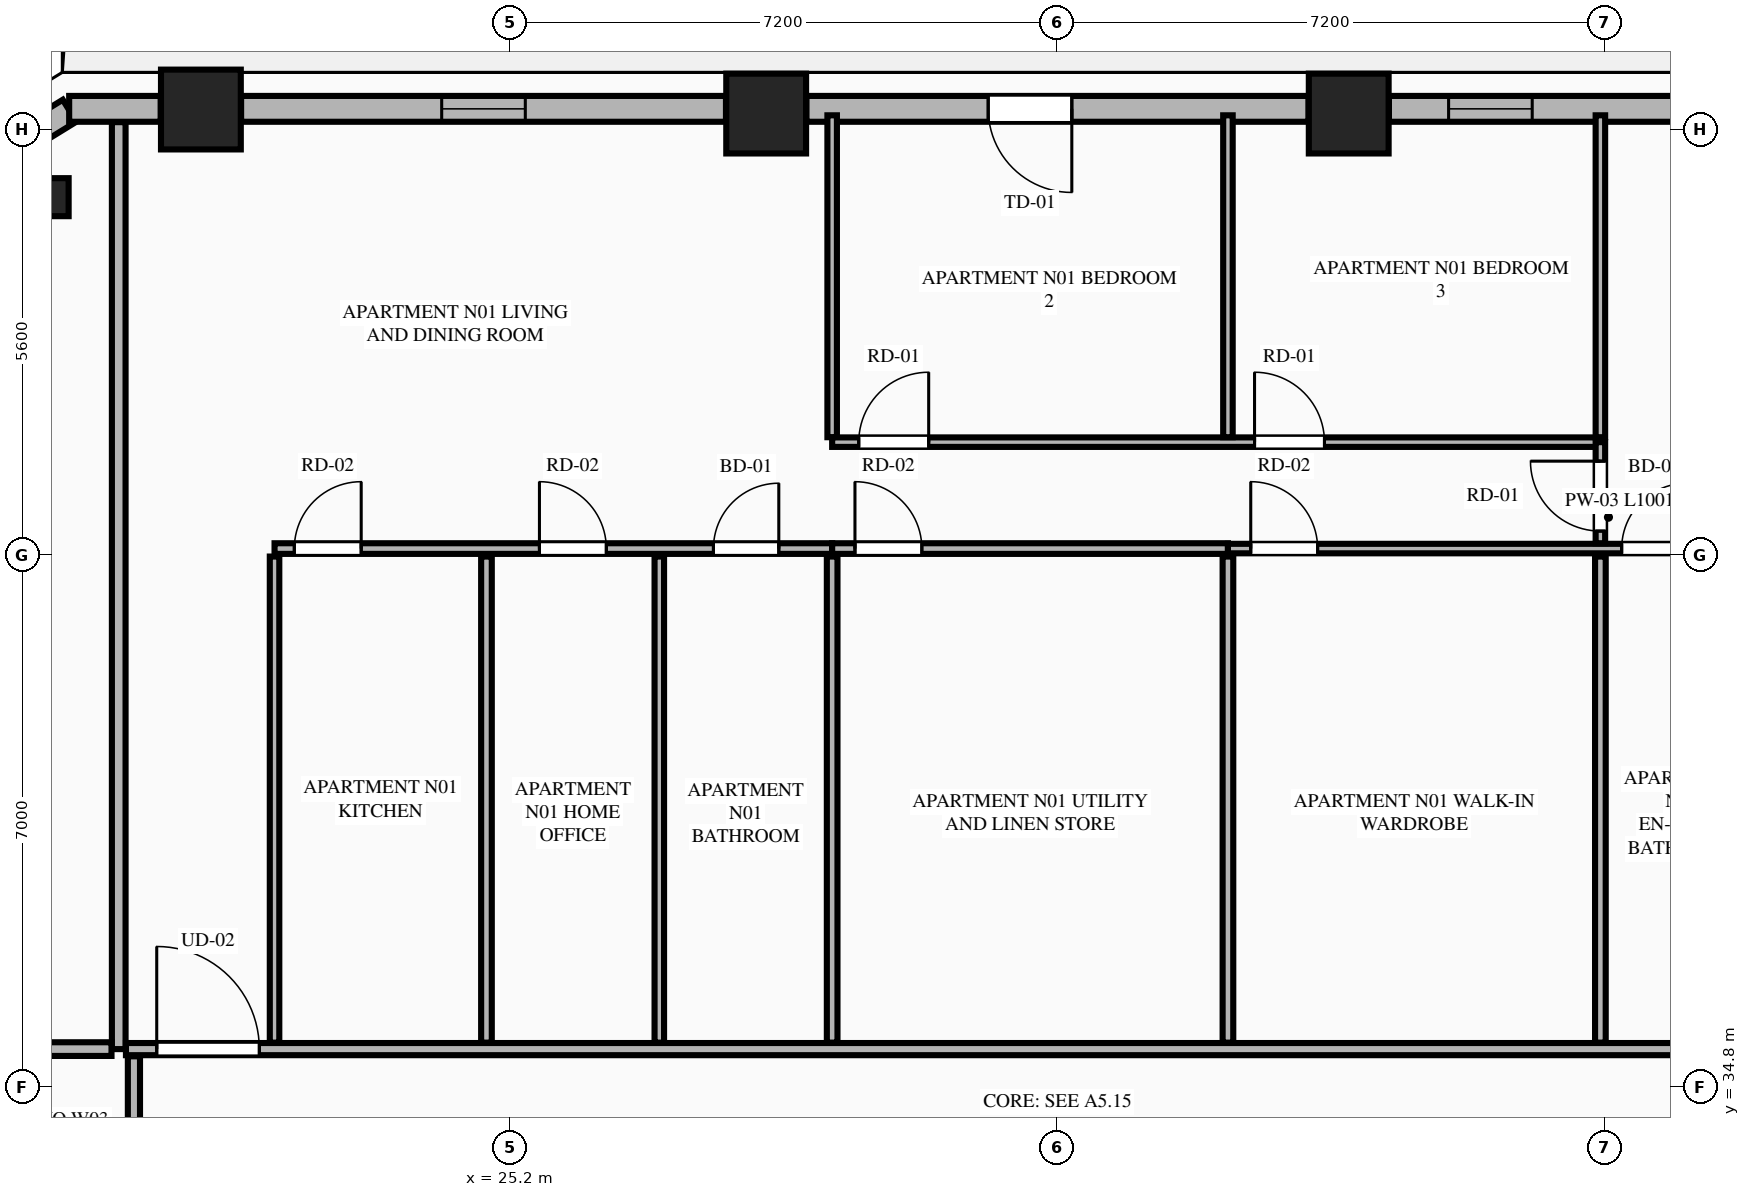
"""IFC4 building model, lengths in metres.
Left out: names, types, materials, properties, quantities, classifications, styles, units other than length and angle.
Written with IfcOpenShell. Run it as: python <this file> out.ifc"""

import sys

from ifc_helpers import new_model, si_unit, direction, frame, frame_2d, origin, origin_2d, place, context, subcontext, project, spatial, rectangle, extrude, element, fill, save


model = new_model("IFC4")
c1 = context("Model", 3, precision=1e-05, world=origin(), true_north=direction((0.0, 1.0)))
c2 = subcontext(c1, "Body", "Model", "MODEL_VIEW")
j1 = project(units=[si_unit("LENGTHUNIT", "METRE"), si_unit("PLANEANGLEUNIT", "RADIAN")], contexts=[c1])
p1 = place(None, origin())
s1 = spatial("IfcSite", under=j1, at=p1, CompositionType="ELEMENT")
p2 = place(p1, origin())
s2 = spatial("IfcBuilding", under=s1, at=p2, CompositionType="ELEMENT")
p3 = place(p2, frame((0.0, 0.0, 116.15)))
s3 = spatial("IfcBuildingStorey", under=s2, at=p3, CompositionType="ELEMENT", Elevation=116.15)
for number, where, z_axis, x_axis in (
    (1, (36.232, 47.608, 0.0), (0.0, 0.0, 1.0), (1.0, 0.0, 0.0)),
    (2, (28.568, 47.608, 0.0), (0.0, 0.0, 1.0), (1.0, 0.0, 0.0)),
    (3, (21.131, 47.661, 0.0), (0.0, 0.0, 1.0), (1.0, 0.0, 0.0)),
):
    element("IfcColumn", number, at=place(p3, frame(where, z_axis=z_axis, x_axis=x_axis)), inside=s3, PredefinedType="COLUMN", context=c2, shape_type="SweptSolid", body=[
        extrude(rectangle(XDim=1.05, YDim=1.05, at=origin_2d()), origin(), (0.0, 0.0, 1.0), 3.55),
    ])
p4 = place(p3, frame((19.141, 46.508, 0.0), z_axis=(0.0, 0.0, 1.0), x_axis=(-0.865160173452, -0.501495637342, 0.0)))
e4 = element("IfcColumn", 4, at=p4, inside=s3, PredefinedType="PILASTER", context=c2, shape_type="SweptSolid", body=[
    extrude(rectangle(XDim=0.5, YDim=0.35, at=origin_2d()), origin(), (0.0, 0.0, 1.0), 3.55),
])
p5 = place(p3, frame((19.403, 47.645, 0.0), z_axis=(0.0, 0.0, 1.0), x_axis=(-0.851798915137, -0.523868884523, 0.0)))
e5 = element("IfcWall", 5, at=p5, inside=s3, PredefinedType="STANDARD", context=c2, shape_type="SweptSolid", body=[
    extrude(rectangle(XDim=1.848, YDim=0.34, at=frame_2d((0.924, 0.0))), origin(), (0.0, 0.0, 1.0), 3.34),
])
p6 = place(p3, frame((43.14, 47.67, 0.0), z_axis=(0.0, 0.0, 1.0), x_axis=(-1.0, 0.0, 0.0)))
e6 = element("IfcWall", 6, at=p6, inside=s3, PredefinedType="STANDARD", context=c2, shape_type="SweptSolid", body=[
    extrude(rectangle(XDim=6.379, YDim=0.34, at=frame_2d((3.189, 0.0))), origin(), (0.0, 0.0, 1.0), 2.797),
])
p7 = place(p6, frame((1.192, 0.0, 0.75)))
e7 = element("IfcOpeningElement", 7, at=p7, cuts=e6, PredefinedType="OPENING", context=c2, shape_type="SweptSolid", body=[
    extrude(rectangle(XDim=1.1, YDim=1.897, at=frame_2d((0.55, 0.948))), frame((0.0, 0.18, 0.0), z_axis=(0.0, -1.0, 0.0), x_axis=(1.0, 0.0, 0.0)), (0.0, 0.0, 1.0), 0.36),
])
p8 = place(p6, frame((4.494, 0.0, 0.75)))
e8 = element("IfcOpeningElement", 8, at=p8, cuts=e6, PredefinedType="OPENING", context=c2, shape_type="SweptSolid", body=[
    extrude(rectangle(XDim=1.1, YDim=1.897, at=frame_2d((0.55, 0.948))), frame((0.0, 0.18, 0.0), z_axis=(0.0, -1.0, 0.0), x_axis=(1.0, 0.0, 0.0)), (0.0, 0.0, 1.0), 0.36),
])
p9 = place(p3, frame((35.703, 47.67, 0.0), z_axis=(0.0, 0.0, 1.0), x_axis=(-1.0, 0.0, 0.0)))
e9 = element("IfcWall", 9, at=p9, inside=s3, PredefinedType="STANDARD", context=c2, shape_type="SweptSolid", body=[
    extrude(rectangle(XDim=6.606, YDim=0.34, at=frame_2d((3.303, 0.0))), origin(), (0.0, 0.0, 1.0), 2.797),
])
p10 = place(p9, frame((3.114, 0.0, 0.0)))
e10 = element("IfcOpeningElement", 10, at=p10, cuts=e9, PredefinedType="OPENING", context=c2, shape_type="SweptSolid", body=[
    extrude(rectangle(XDim=1.1, YDim=2.25, at=frame_2d((0.55, 1.125))), frame((0.0, 0.18, 0.0), z_axis=(0.0, -1.0, 0.0), x_axis=(1.0, 0.0, 0.0)), (0.0, 0.0, 1.0), 0.36),
])
p11 = place(p3, frame((28.039, 47.67, 0.0), z_axis=(0.0, 0.0, 1.0), x_axis=(-1.0, 0.0, 0.0)))
e11 = element("IfcWall", 11, at=p11, inside=s3, PredefinedType="STANDARD", context=c2, shape_type="SweptSolid", body=[
    extrude(rectangle(XDim=6.379, YDim=0.34, at=frame_2d((3.189, 0.0))), origin(), (0.0, 0.0, 1.0), 2.797),
])
p12 = place(p11, frame((2.64, 0.0, 0.75)))
e12 = element("IfcOpeningElement", 12, at=p12, cuts=e11, PredefinedType="OPENING", context=c2, shape_type="SweptSolid", body=[
    extrude(rectangle(XDim=1.1, YDim=1.897, at=frame_2d((0.55, 0.948))), frame((0.0, 0.18, 0.0), z_axis=(0.0, -1.0, 0.0), x_axis=(1.0, 0.0, 0.0)), (0.0, 0.0, 1.0), 0.36),
])
p13 = place(p3, frame((20.602, 47.67, 0.0), z_axis=(0.0, 0.0, 1.0), x_axis=(-1.0, 0.0, 0.0)))
e13 = element("IfcWall", 13, at=p13, inside=s3, PredefinedType="STANDARD", context=c2, shape_type="SweptSolid", body=[
    extrude(rectangle(XDim=1.204, YDim=0.34, at=frame_2d((0.602, 0.0))), origin(), (0.0, 0.0, 1.0), 3.34),
])
p14 = place(p3, frame((20.05, 35.3, 0.0), z_axis=(0.0, 0.0, 1.0), x_axis=(0.0, 1.0, 0.0)))
e14 = element("IfcWall", 14, at=p14, inside=s3, PredefinedType="PARTITIONING", context=c2, shape_type="SweptSolid", body=[
    extrude(rectangle(XDim=12.195, YDim=0.18, at=frame_2d((6.098, 0.0))), origin(), (0.0, 0.0, 1.0), 3.34),
])
p15 = place(p3, frame((20.145, 35.3, 0.0), z_axis=(0.0, 0.0, 1.0), x_axis=(1.0, 0.0, 0.0)))
e15 = element("IfcWall", 15, at=p15, inside=s3, PredefinedType="PARTITIONING", context=c2, shape_type="SweptSolid", body=[
    extrude(rectangle(XDim=24.51, YDim=0.16, at=frame_2d((12.255, 0.0))), origin(), (0.0, 0.0, 1.0), 3.34),
])
p16 = place(p15, frame((0.405, 0.0, 0.0)))
e16 = element("IfcOpeningElement", 16, at=p16, cuts=e15, PredefinedType="OPENING", context=c2, shape_type="SweptSolid", body=[
    extrude(rectangle(XDim=1.35, YDim=2.35, at=frame_2d((0.675, 1.175))), frame((0.0, 0.09, 0.0), z_axis=(0.0, -1.0, 0.0), x_axis=(1.0, 0.0, 0.0)), (0.0, 0.0, 1.0), 0.18),
])
p17 = place(p3, frame((22.1, 35.385, 0.0), z_axis=(0.0, 0.0, 1.0), x_axis=(0.0, 1.0, 0.0)))
e17 = element("IfcWall", 17, at=p17, inside=s3, PredefinedType="PARTITIONING", context=c2, shape_type="SweptSolid", body=[
    extrude(rectangle(XDim=6.395, YDim=0.125, at=frame_2d((3.198, 0.0))), origin(), (0.0, 0.0, 1.0), 2.722),
])
p18 = place(p3, frame((22.1, 41.885, 0.0), z_axis=(0.0, 0.0, 1.0), x_axis=(1.0, 0.0, 0.0)))
e18 = element("IfcWall", 18, at=p18, inside=s3, PredefinedType="PLUMBINGWALL", context=c2, shape_type="SweptSolid", body=[
    extrude(rectangle(XDim=7.336, YDim=0.14, at=frame_2d((3.668, 0.0))), origin(), (0.0, 0.0, 1.0), 3.34),
])
p19 = place(p18, frame((5.774, 0.0, 0.0)))
e19 = element("IfcOpeningElement", 19, at=p19, cuts=e18, PredefinedType="OPENING", context=c2, shape_type="SweptSolid", body=[
    extrude(rectangle(XDim=0.86, YDim=2.1, at=frame_2d((0.43, 1.05))), frame((0.0, 0.08, 0.0), z_axis=(0.0, -1.0, 0.0), x_axis=(1.0, 0.0, 0.0)), (0.0, 0.0, 1.0), 0.16),
])
p20 = place(p18, frame((0.26, 0.0, 0.0)))
e20 = element("IfcOpeningElement", 20, at=p20, cuts=e18, PredefinedType="OPENING", context=c2, shape_type="SweptSolid", body=[
    extrude(rectangle(XDim=0.88, YDim=2.15, at=frame_2d((0.44, 1.075))), frame((0.0, 0.08, 0.0), z_axis=(0.0, -1.0, 0.0), x_axis=(1.0, 0.0, 0.0)), (0.0, 0.0, 1.0), 0.16),
])
p21 = place(p18, frame((3.485, 0.0, 0.0)))
e21 = element("IfcOpeningElement", 21, at=p21, cuts=e18, PredefinedType="OPENING", context=c2, shape_type="SweptSolid", body=[
    extrude(rectangle(XDim=0.88, YDim=2.15, at=frame_2d((0.44, 1.075))), frame((0.0, 0.08, 0.0), z_axis=(0.0, -1.0, 0.0), x_axis=(1.0, 0.0, 0.0)), (0.0, 0.0, 1.0), 0.16),
])
p22 = place(p3, frame((29.436, 41.885, 0.0), z_axis=(0.0, 0.0, 1.0), x_axis=(1.0, 0.0, 0.0)))
e22 = element("IfcWall", 22, at=p22, inside=s3, PredefinedType="PLUMBINGWALL", context=c2, shape_type="SweptSolid", body=[
    extrude(rectangle(XDim=5.207, YDim=0.14, at=frame_2d((2.604, 0.0))), origin(), (0.0, 0.0, 1.0), 3.34),
])
p23 = place(p22, frame((0.3, 0.0, 0.0)))
e23 = element("IfcOpeningElement", 23, at=p23, cuts=e22, PredefinedType="OPENING", context=c2, shape_type="SweptSolid", body=[
    extrude(rectangle(XDim=0.88, YDim=2.15, at=frame_2d((0.44, 1.075))), frame((0.0, 0.08, 0.0), z_axis=(0.0, -1.0, 0.0), x_axis=(1.0, 0.0, 0.0)), (0.0, 0.0, 1.0), 0.16),
])
p24 = place(p3, frame((34.643, 41.885, 0.0), z_axis=(0.0, 0.0, 1.0), x_axis=(1.0, 0.0, 0.0)))
e24 = element("IfcWall", 24, at=p24, inside=s3, PredefinedType="PARTITIONING", context=c2, shape_type="SweptSolid", body=[
    extrude(rectangle(XDim=10.012, YDim=0.125, at=frame_2d((5.006, 0.0))), origin(), (0.0, 0.0, 1.0), 3.34),
])
p25 = place(p24, frame((5.18, 0.0, 0.0)))
e25 = element("IfcOpeningElement", 25, at=p25, cuts=e24, PredefinedType="OPENING", context=c2, shape_type="SweptSolid", body=[
    extrude(rectangle(XDim=0.86, YDim=2.1, at=frame_2d((0.43, 1.05))), frame((0.0, 0.073, 0.0), z_axis=(0.0, -1.0, 0.0), x_axis=(1.0, 0.0, 0.0)), (0.0, 0.0, 1.0), 0.145),
])
p26 = place(p24, frame((7.328, 0.0, 0.0)))
e26 = element("IfcOpeningElement", 26, at=p26, cuts=e24, PredefinedType="OPENING", context=c2, shape_type="SweptSolid", body=[
    extrude(rectangle(XDim=0.88, YDim=2.15, at=frame_2d((0.44, 1.075))), frame((0.0, 0.073, 0.0), z_axis=(0.0, -1.0, 0.0), x_axis=(1.0, 0.0, 0.0)), (0.0, 0.0, 1.0), 0.145),
])
p27 = place(p24, frame((0.3, 0.0, 0.0)))
e27 = element("IfcOpeningElement", 27, at=p27, cuts=e24, PredefinedType="OPENING", context=c2, shape_type="SweptSolid", body=[
    extrude(rectangle(XDim=0.88, YDim=2.15, at=frame_2d((0.44, 1.075))), frame((0.0, 0.073, 0.0), z_axis=(0.0, -1.0, 0.0), x_axis=(1.0, 0.0, 0.0)), (0.0, 0.0, 1.0), 0.145),
])
p28 = place(p3, frame((24.888, 35.385, 0.0), z_axis=(0.0, 0.0, 1.0), x_axis=(0.0, 1.0, 0.0)))
e28 = element("IfcWall", 28, at=p28, inside=s3, PredefinedType="PLUMBINGWALL", context=c2, shape_type="SweptSolid", body=[
    extrude(rectangle(XDim=6.395, YDim=0.14, at=frame_2d((3.198, 0.0))), origin(), (0.0, 0.0, 1.0), 3.34),
])
p29 = place(p3, frame((27.162, 35.385, 0.0), z_axis=(0.0, 0.0, 1.0), x_axis=(0.0, 1.0, 0.0)))
e29 = element("IfcWall", 29, at=p29, inside=s3, PredefinedType="PARTITIONING", context=c2, shape_type="SweptSolid", body=[
    extrude(rectangle(XDim=6.395, YDim=0.125, at=frame_2d((3.198, 0.0))), origin(), (0.0, 0.0, 1.0), 3.34),
])
p30 = place(p3, frame((29.436, 43.35, 0.0), z_axis=(0.0, 0.0, 1.0), x_axis=(0.0, 1.0, 0.0)))
e30 = element("IfcWall", 30, at=p30, inside=s3, PredefinedType="PARTITIONING", context=c2, shape_type="SweptSolid", body=[
    extrude(rectangle(XDim=4.235, YDim=0.125, at=frame_2d((2.117, 0.0))), origin(), (0.0, 0.0, 1.0), 3.34),
])
p31 = place(p3, frame((29.436, 43.285, 0.0), z_axis=(0.0, 0.0, 1.0), x_axis=(1.0, 0.0, 0.0)))
e31 = element("IfcWall", 31, at=p31, inside=s3, PredefinedType="PARTITIONING", context=c2, shape_type="SweptSolid", body=[
    extrude(rectangle(XDim=10.107, YDim=0.125, at=frame_2d((5.053, 0.0))), origin(), (0.0, 0.0, 1.0), 3.34),
])
p32 = place(p31, frame((0.35, 0.0, 0.0)))
e32 = element("IfcOpeningElement", 32, at=p32, cuts=e31, PredefinedType="OPENING", context=c2, shape_type="SweptSolid", body=[
    extrude(rectangle(XDim=0.92, YDim=2.15, at=frame_2d((0.46, 1.075))), frame((0.0, 0.073, 0.0), z_axis=(0.0, -1.0, 0.0), x_axis=(1.0, 0.0, 0.0)), (0.0, 0.0, 1.0), 0.145),
])
p33 = place(p31, frame((5.557, 0.0, 0.0)))
e33 = element("IfcOpeningElement", 33, at=p33, cuts=e31, PredefinedType="OPENING", context=c2, shape_type="SweptSolid", body=[
    extrude(rectangle(XDim=0.92, YDim=2.15, at=frame_2d((0.46, 1.075))), frame((0.0, 0.073, 0.0), z_axis=(0.0, -1.0, 0.0), x_axis=(1.0, 0.0, 0.0)), (0.0, 0.0, 1.0), 0.145),
])
p34 = place(p3, frame((39.543, 41.955, 0.0), z_axis=(0.0, 0.0, 1.0), x_axis=(0.0, 1.0, 0.0)))
e34 = element("IfcWall", 34, at=p34, inside=s3, PredefinedType="PARTITIONING", context=c2, shape_type="SweptSolid", body=[
    extrude(rectangle(XDim=1.33, YDim=0.125, at=frame_2d((0.665, 0.0))), origin(), (0.0, 0.0, 1.0), 3.34),
])
p35 = place(p34, frame((0.16, 0.0, 0.0)))
e35 = element("IfcOpeningElement", 35, at=p35, cuts=e34, PredefinedType="OPENING", context=c2, shape_type="SweptSolid", body=[
    extrude(rectangle(XDim=0.92, YDim=2.15, at=frame_2d((0.46, 1.075))), frame((0.0, 0.073, 0.0), z_axis=(0.0, -1.0, 0.0), x_axis=(1.0, 0.0, 0.0)), (0.0, 0.0, 1.0), 0.145),
])
for number, where, z_axis, x_axis in (
    (36, (29.436, 35.385, 0.0), (0.0, 0.0, 1.0), (0.0, 1.0, 0.0)),
    (37, (34.643, 35.385, 0.0), (0.0, 0.0, 1.0), (0.0, 1.0, 0.0)),
):
    element("IfcWall", number, at=place(p3, frame(where, z_axis=z_axis, x_axis=x_axis)), inside=s3, PredefinedType="PLUMBINGWALL", context=c2, shape_type="SweptSolid", body=[
        extrude(rectangle(XDim=6.395, YDim=0.14, at=frame_2d((3.198, 0.0))), origin(), (0.0, 0.0, 1.0), 3.34),
    ])
for number, where, z_axis, x_axis in (
    (38, (34.643, 43.35, 0.0), (0.0, 0.0, 1.0), (0.0, 1.0, 0.0)),
    (39, (39.543, 43.35, 0.0), (0.0, 0.0, 1.0), (0.0, 1.0, 0.0)),
):
    element("IfcWall", number, at=place(p3, frame(where, z_axis=z_axis, x_axis=x_axis)), inside=s3, PredefinedType="PARTITIONING", context=c2, shape_type="SweptSolid", body=[
        extrude(rectangle(XDim=4.235, YDim=0.125, at=frame_2d((2.117, 0.0))), origin(), (0.0, 0.0, 1.0), 3.34),
    ])
p36 = place(p3, frame((39.543, 35.385, 0.0), z_axis=(0.0, 0.0, 1.0), x_axis=(0.0, 1.0, 0.0)))
e40 = element("IfcWall", 40, at=p36, inside=s3, PredefinedType="PLUMBINGWALL", context=c2, shape_type="SweptSolid", body=[
    extrude(rectangle(XDim=6.395, YDim=0.14, at=frame_2d((3.198, 0.0))), origin(), (0.0, 0.0, 1.0), 3.34),
])
p37 = place(p3, frame((12.286, 35.3, 0.0), z_axis=(0.0, 0.0, 1.0), x_axis=(1.0, 0.0, 0.0)))
e41 = element("IfcWall", 41, at=p37, inside=s3, PredefinedType="PARTITIONING", context=c2, shape_type="SweptSolid", body=[
    extrude(rectangle(XDim=7.669, YDim=0.18, at=frame_2d((3.834, 0.0))), origin(), (0.0, 0.0, 1.0), 3.34),
])
p38 = place(p3, frame((20.25, 29.379, 0.0), z_axis=(0.0, 0.0, 1.0), x_axis=(0.0, 1.0, 0.0)))
e42 = element("IfcWall", 42, at=p38, inside=s3, PredefinedType="PARTITIONING", context=c2, shape_type="SweptSolid", body=[
    extrude(rectangle(XDim=5.826, YDim=0.16, at=frame_2d((2.913, 0.0))), origin(), (0.0, 0.0, 1.0), 3.34),
])
p39 = place(p38, frame((0.4, 0.0, 0.0)))
e43 = element("IfcOpeningElement", 43, at=p39, cuts=e42, PredefinedType="OPENING", context=c2, shape_type="SweptSolid", body=[
    extrude(rectangle(XDim=1.02, YDim=2.25, at=frame_2d((0.51, 1.125))), frame((0.0, 0.09, 0.0), z_axis=(0.0, -1.0, 0.0), x_axis=(1.0, 0.0, 0.0)), (0.0, 0.0, 1.0), 0.18),
])
p40 = place(p10, origin())
e44 = element("IfcDoor", 44, at=p40, inside=s3, OperationType="SINGLE_SWING_LEFT", PredefinedType="DOOR", context=c2, shape_type="SweptSolid", body=[
    extrude(rectangle(XDim=1.1, YDim=2.25, at=frame_2d((0.55, 1.125))), frame((0.0, 0.025, 0.0), z_axis=(0.0, -1.0, 0.0), x_axis=(1.0, 0.0, 0.0)), (0.0, 0.0, 1.0), 0.05),
])
fill(e10, e44)
p41 = place(p12, origin())
e45 = element("IfcWindow", 45, at=p41, inside=s3, PartitioningType="SINGLE_PANEL", PredefinedType="WINDOW", context=c2, shape_type="SweptSolid", body=[
    extrude(rectangle(XDim=1.1, YDim=1.897, at=frame_2d((0.55, 0.948))), frame((0.0, 0.03, 0.0), z_axis=(0.0, -1.0, 0.0), x_axis=(1.0, 0.0, 0.0)), (0.0, 0.0, 1.0), 0.06),
])
fill(e12, e45)
p42 = place(p19, origin())
e46 = element("IfcDoor", 46, at=p42, inside=s3, OperationType="SINGLE_SWING_RIGHT", PredefinedType="DOOR", context=c2, shape_type="SweptSolid", body=[
    extrude(rectangle(XDim=0.86, YDim=2.1, at=frame_2d((0.43, 1.05))), frame((0.0, 0.025, 0.0), z_axis=(0.0, -1.0, 0.0), x_axis=(1.0, 0.0, 0.0)), (0.0, 0.0, 1.0), 0.05),
])
fill(e19, e46)
p43 = place(p25, origin())
e47 = element("IfcDoor", 47, at=p43, inside=s3, OperationType="SINGLE_SWING_RIGHT", PredefinedType="DOOR", context=c2, shape_type="SweptSolid", body=[
    extrude(rectangle(XDim=0.86, YDim=2.1, at=frame_2d((0.43, 1.05))), frame((0.0, 0.025, 0.0), z_axis=(0.0, -1.0, 0.0), x_axis=(1.0, 0.0, 0.0)), (0.0, 0.0, 1.0), 0.05),
])
fill(e25, e47)
p44 = place(p16, origin())
e48 = element("IfcDoor", 48, at=p44, inside=s3, OperationType="SINGLE_SWING_LEFT", PredefinedType="DOOR", context=c2, shape_type="SweptSolid", body=[
    extrude(rectangle(XDim=1.35, YDim=2.35, at=frame_2d((0.675, 1.175))), frame((0.0, 0.025, 0.0), z_axis=(0.0, -1.0, 0.0), x_axis=(1.0, 0.0, 0.0)), (0.0, 0.0, 1.0), 0.05),
])
fill(e16, e48)
p45 = place(p20, origin())
e49 = element("IfcDoor", 49, at=p45, inside=s3, OperationType="SINGLE_SWING_RIGHT", PredefinedType="DOOR", context=c2, shape_type="SweptSolid", body=[
    extrude(rectangle(XDim=0.88, YDim=2.15, at=frame_2d((0.44, 1.075))), frame((0.0, 0.025, 0.0), z_axis=(0.0, -1.0, 0.0), x_axis=(1.0, 0.0, 0.0)), (0.0, 0.0, 1.0), 0.05),
])
fill(e20, e49)
p46 = place(p21, origin())
e50 = element("IfcDoor", 50, at=p46, inside=s3, OperationType="SINGLE_SWING_LEFT", PredefinedType="DOOR", context=c2, shape_type="SweptSolid", body=[
    extrude(rectangle(XDim=0.88, YDim=2.15, at=frame_2d((0.44, 1.075))), frame((0.0, 0.025, 0.0), z_axis=(0.0, -1.0, 0.0), x_axis=(1.0, 0.0, 0.0)), (0.0, 0.0, 1.0), 0.05),
])
fill(e21, e50)
p47 = place(p23, origin())
e51 = element("IfcDoor", 51, at=p47, inside=s3, OperationType="SINGLE_SWING_LEFT", PredefinedType="DOOR", context=c2, shape_type="SweptSolid", body=[
    extrude(rectangle(XDim=0.88, YDim=2.15, at=frame_2d((0.44, 1.075))), frame((0.0, 0.025, 0.0), z_axis=(0.0, -1.0, 0.0), x_axis=(1.0, 0.0, 0.0)), (0.0, 0.0, 1.0), 0.05),
])
fill(e23, e51)
p48 = place(p32, origin())
e52 = element("IfcDoor", 52, at=p48, inside=s3, OperationType="SINGLE_SWING_RIGHT", PredefinedType="DOOR", context=c2, shape_type="SweptSolid", body=[
    extrude(rectangle(XDim=0.92, YDim=2.15, at=frame_2d((0.46, 1.075))), frame((0.0, 0.025, 0.0), z_axis=(0.0, -1.0, 0.0), x_axis=(1.0, 0.0, 0.0)), (0.0, 0.0, 1.0), 0.05),
])
fill(e32, e52)
p49 = place(p33, origin())
e53 = element("IfcDoor", 53, at=p49, inside=s3, OperationType="SINGLE_SWING_LEFT", PredefinedType="DOOR", context=c2, shape_type="SweptSolid", body=[
    extrude(rectangle(XDim=0.92, YDim=2.15, at=frame_2d((0.46, 1.075))), frame((0.0, 0.025, 0.0), z_axis=(0.0, -1.0, 0.0), x_axis=(1.0, 0.0, 0.0)), (0.0, 0.0, 1.0), 0.05),
])
fill(e33, e53)
p50 = place(p35, origin())
e54 = element("IfcDoor", 54, at=p50, inside=s3, OperationType="SINGLE_SWING_RIGHT", PredefinedType="DOOR", context=c2, shape_type="SweptSolid", body=[
    extrude(rectangle(XDim=0.92, YDim=2.15, at=frame_2d((0.46, 1.075))), frame((0.0, 0.025, 0.0), z_axis=(0.0, -1.0, 0.0), x_axis=(1.0, 0.0, 0.0)), (0.0, 0.0, 1.0), 0.05),
])
fill(e35, e54)
p51 = place(p27, origin())
e55 = element("IfcDoor", 55, at=p51, inside=s3, OperationType="SINGLE_SWING_LEFT", PredefinedType="DOOR", context=c2, shape_type="SweptSolid", body=[
    extrude(rectangle(XDim=0.88, YDim=2.15, at=frame_2d((0.44, 1.075))), frame((0.0, 0.025, 0.0), z_axis=(0.0, -1.0, 0.0), x_axis=(1.0, 0.0, 0.0)), (0.0, 0.0, 1.0), 0.05),
])
fill(e27, e55)
p52 = place(p8, origin())
e56 = element("IfcWindow", 56, at=p52, inside=s3, PartitioningType="SINGLE_PANEL", PredefinedType="WINDOW", context=c2, shape_type="SweptSolid", body=[
    extrude(rectangle(XDim=1.1, YDim=1.897, at=frame_2d((0.55, 0.948))), frame((0.0, 0.03, 0.0), z_axis=(0.0, -1.0, 0.0), x_axis=(1.0, 0.0, 0.0)), (0.0, 0.0, 1.0), 0.06),
])
fill(e8, e56)
save(model, sys.argv[1])
